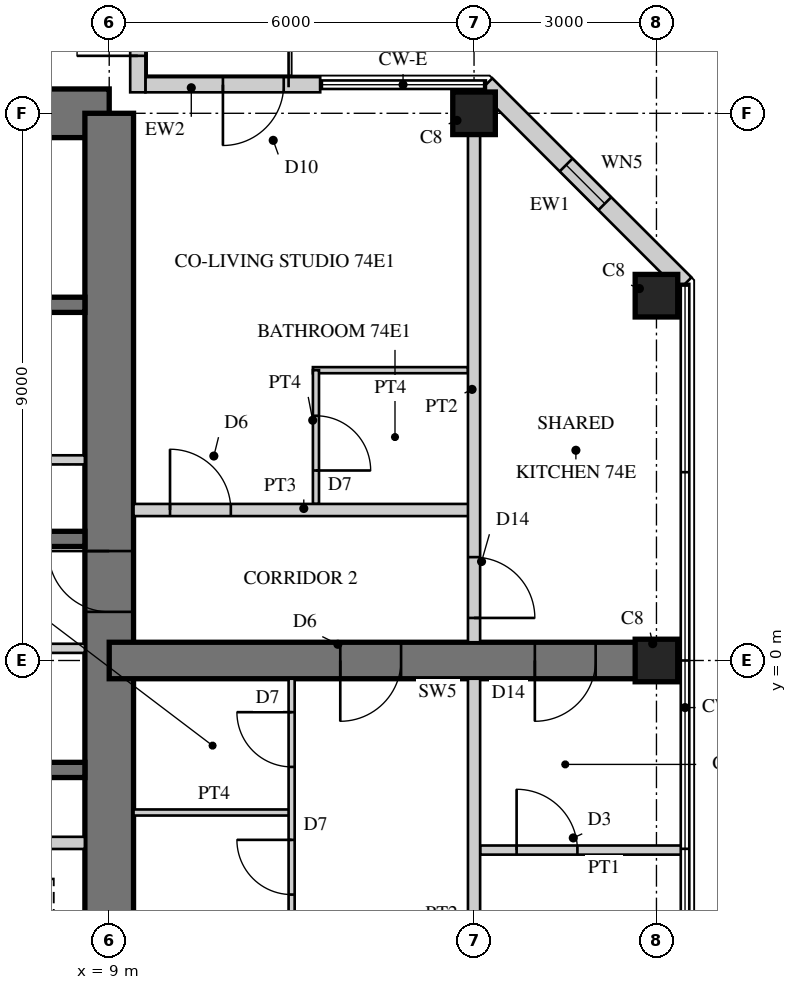
"""IFC4 building model, lengths in metres.
Left out: names, types, materials, properties, quantities, classifications, styles, units other than length and angle.
Written with IfcOpenShell. Run it as: python <this file> out.ifc"""

import sys

from ifc_helpers import new_model, si_unit, direction, frame, frame_2d, origin, origin_2d, place, context, subcontext, project, spatial, rectangle, hollow_rectangle, extrude, element, fill, save


model = new_model("IFC4")
c1 = context("Model", 3, precision=1e-05, world=origin(), true_north=direction((0.0, 1.0)))
c2 = subcontext(c1, "Body", "Model", "MODEL_VIEW")
j1 = project(units=[si_unit("LENGTHUNIT", "METRE"), si_unit("PLANEANGLEUNIT", "RADIAN")], contexts=[c1])
p1 = place(None, origin())
s1 = spatial("IfcSite", under=j1, at=p1, CompositionType="ELEMENT")
p2 = place(p1, origin())
s2 = spatial("IfcBuilding", under=s1, at=p2, CompositionType="ELEMENT")
p3 = place(p2, frame((0.0, 0.0, 284.9)))
s3 = spatial("IfcBuildingStorey", under=s2, at=p3, CompositionType="ELEMENT", Elevation=284.9)
p4 = place(p3, frame((9.0, 9.0, 0.0), z_axis=(0.0, 0.0, 1.0), x_axis=(-1.0, 0.0, 0.0)))
e1 = element("IfcWall", 1, at=p4, inside=s3, PredefinedType="SHEAR", context=c2, shape_type="SweptSolid", body=[
    extrude(rectangle(XDim=18.0, YDim=0.8, at=frame_2d((9.0, 0.0))), origin(), (0.0, 0.0, 1.0), 3.4),
])
p5 = place(p4, frame((9.8, 0.0, 0.0)))
e2 = element("IfcOpeningElement", 2, at=p5, cuts=e1, PredefinedType="OPENING", context=c2, shape_type="SweptSolid", body=[
    extrude(rectangle(XDim=1.0, YDim=2.4, at=frame_2d((0.5, 1.2))), frame((0.0, 0.41, 0.0), z_axis=(0.0, -1.0, 0.0), x_axis=(1.0, 0.0, 0.0)), (0.0, 0.0, 1.0), 0.82),
])
p6 = place(p3, frame((9.0, -9.0, 0.0), z_axis=(0.0, 0.0, 1.0), x_axis=(0.0, 1.0, 0.0)))
e3 = element("IfcWall", 3, at=p6, inside=s3, PredefinedType="SHEAR", context=c2, shape_type="SweptSolid", body=[
    extrude(rectangle(XDim=18.0, YDim=0.8, at=frame_2d((9.0, 0.0))), origin(), (0.0, 0.0, 1.0), 3.4),
])
p7 = place(p6, frame((9.8, 0.0, 0.0)))
e4 = element("IfcOpeningElement", 4, at=p7, cuts=e3, PredefinedType="OPENING", context=c2, shape_type="SweptSolid", body=[
    extrude(rectangle(XDim=1.0, YDim=2.4, at=frame_2d((0.5, 1.2))), frame((0.0, 0.41, 0.0), z_axis=(0.0, -1.0, 0.0), x_axis=(1.0, 0.0, 0.0)), (0.0, 0.0, 1.0), 0.82),
])
p8 = place(p3, frame((1.925, 2.0, 0.0), z_axis=(0.0, 0.0, 1.0), x_axis=(1.0, 0.0, 0.0)))
e5 = element("IfcWall", 5, at=p8, inside=s3, PredefinedType="SHEAR", context=c2, shape_type="SweptSolid", body=[
    extrude(rectangle(XDim=6.675, YDim=0.25, at=frame_2d((3.337, 0.0))), origin(), (0.0, 0.0, 1.0), 3.4),
])
p9 = place(p3, frame((1.925, 5.85, 0.0), z_axis=(0.0, 0.0, 1.0), x_axis=(1.0, 0.0, 0.0)))
e6 = element("IfcWall", 6, at=p9, inside=s3, PredefinedType="SHEAR", context=c2, shape_type="SweptSolid", body=[
    extrude(rectangle(XDim=6.675, YDim=0.25, at=frame_2d((3.337, 0.0))), origin(), (0.0, 0.0, 1.0), 3.4),
])
p10 = place(p9, frame((0.546, 0.0, 0.0)))
e7 = element("IfcOpeningElement", 7, at=p10, cuts=e6, PredefinedType="OPENING", context=c2, shape_type="SweptSolid", body=[
    extrude(rectangle(XDim=1.0, YDim=2.1, at=frame_2d((0.5, 1.05))), frame((0.0, 0.135, 0.0), z_axis=(0.0, -1.0, 0.0), x_axis=(1.0, 0.0, 0.0)), (0.0, 0.0, 1.0), 0.27),
])
p11 = place(p9, frame((2.837, 0.0, 0.0)))
e8 = element("IfcOpeningElement", 8, at=p11, cuts=e6, PredefinedType="OPENING", context=c2, shape_type="SweptSolid", body=[
    extrude(rectangle(XDim=1.0, YDim=2.1, at=frame_2d((0.5, 1.05))), frame((0.0, 0.135, 0.0), z_axis=(0.0, -1.0, 0.0), x_axis=(1.0, 0.0, 0.0)), (0.0, 0.0, 1.0), 0.27),
])
p12 = place(p3, frame((1.925, 3.3, 0.0), z_axis=(0.0, 0.0, 1.0), x_axis=(1.0, 0.0, 0.0)))
e9 = element("IfcWall", 9, at=p12, inside=s3, PredefinedType="PARTITIONING", context=c2, shape_type="SweptSolid", body=[
    extrude(rectangle(XDim=6.675, YDim=0.15, at=frame_2d((3.337, 0.0))), origin(), (0.0, 0.0, 1.0), 3.4),
])
p13 = place(p12, frame((0.075, 0.0, 0.0)))
e10 = element("IfcOpeningElement", 10, at=p13, cuts=e9, PredefinedType="OPENING", context=c2, shape_type="SweptSolid", body=[
    extrude(rectangle(XDim=0.8, YDim=2.1, at=frame_2d((0.4, 1.05))), frame((0.0, 0.085, 0.0), z_axis=(0.0, -1.0, 0.0), x_axis=(1.0, 0.0, 0.0)), (0.0, 0.0, 1.0), 0.17),
])
p14 = place(p12, frame((3.675, 0.0, 0.0)))
e11 = element("IfcOpeningElement", 11, at=p14, cuts=e9, PredefinedType="OPENING", context=c2, shape_type="SweptSolid", body=[
    extrude(rectangle(XDim=0.8, YDim=2.1, at=frame_2d((0.4, 1.05))), frame((0.0, 0.085, 0.0), z_axis=(0.0, -1.0, 0.0), x_axis=(1.0, 0.0, 0.0)), (0.0, 0.0, 1.0), 0.17),
])
p15 = place(p3, frame((2.125, -1.8, 0.0), z_axis=(0.0, 0.0, 1.0), x_axis=(1.0, 0.0, 0.0)))
e12 = element("IfcWall", 12, at=p15, inside=s3, PredefinedType="SHEAR", context=c2, shape_type="SweptSolid", body=[
    extrude(rectangle(XDim=6.475, YDim=0.25, at=frame_2d((3.238, 0.0))), origin(), (0.0, 0.0, 1.0), 3.4),
])
p16 = place(p3, frame((5.725, -3.0, 0.0), z_axis=(0.0, 0.0, 1.0), x_axis=(1.0, 0.0, 0.0)))
e13 = element("IfcWall", 13, at=p16, inside=s3, PredefinedType="PARTITIONING", context=c2, shape_type="SweptSolid", body=[
    extrude(rectangle(XDim=2.875, YDim=0.2, at=frame_2d((1.438, 0.0))), origin(), (0.0, 0.0, 1.0), 3.4),
])
p17 = place(p3, frame((9.0, 0.0, 0.0), z_axis=(0.0, 0.0, 1.0), x_axis=(1.0, 0.0, 0.0)))
e14 = element("IfcWall", 14, at=p17, inside=s3, PredefinedType="SHEAR", context=c2, shape_type="SweptSolid", body=[
    extrude(rectangle(XDim=9.0, YDim=0.6, at=frame_2d((4.5, 0.0))), origin(), (0.0, 0.0, 1.0), 3.4),
])
p18 = place(p17, frame((3.8, 0.0, 0.0)))
e15 = element("IfcOpeningElement", 15, at=p18, cuts=e14, PredefinedType="OPENING", context=c2, shape_type="SweptSolid", body=[
    extrude(rectangle(XDim=1.0, YDim=2.15, at=frame_2d((0.5, 1.075))), frame((0.0, 0.31, 0.0), z_axis=(0.0, -1.0, 0.0), x_axis=(1.0, 0.0, 0.0)), (0.0, 0.0, 1.0), 0.62),
])
p19 = place(p17, frame((7.0, 0.0, 0.0)))
e16 = element("IfcOpeningElement", 16, at=p19, cuts=e14, PredefinedType="OPENING", context=c2, shape_type="SweptSolid", body=[
    extrude(rectangle(XDim=1.0, YDim=2.2, at=frame_2d((0.5, 1.1))), frame((0.0, 0.31, 0.0), z_axis=(0.0, -1.0, 0.0), x_axis=(1.0, 0.0, 0.0)), (0.0, 0.0, 1.0), 0.62),
])
for number, where, z_axis, x_axis in (
    (17, (15.0, 9.0, 0.0), (0.0, 0.0, 1.0), (1.0, 0.0, 0.0)),
    (18, (18.0, 0.0, 0.0), (0.0, 0.0, 1.0), (1.0, 0.0, 0.0)),
    (19, (18.0, 6.0, 0.0), (0.0, 0.0, 1.0), (1.0, 0.0, 0.0)),
):
    element("IfcColumn", number, at=place(p3, frame(where, z_axis=z_axis, x_axis=x_axis)), inside=s3, PredefinedType="COLUMN", context=c2, shape_type="SweptSolid", body=[
        extrude(rectangle(XDim=0.7, YDim=0.7, at=origin_2d()), origin(), (0.0, 0.0, 1.0), 3.4),
    ])
p20 = place(p3, frame((18.47, 6.195, 0.0), z_axis=(0.0, 0.0, 1.0), x_axis=(-0.707106781187, 0.707106781187, 0.0)))
e20 = element("IfcWall", 20, at=p20, inside=s3, PredefinedType="SOLIDWALL", context=c2, shape_type="SweptSolid", body=[
    extrude(rectangle(XDim=4.632, YDim=0.3, at=frame_2d((2.316, 0.0))), origin(), (0.0, 0.0, 1.0), 3.2),
])
p21 = place(p20, frame((1.866, 0.0, 0.3)))
e21 = element("IfcOpeningElement", 21, at=p21, cuts=e20, PredefinedType="OPENING", context=c2, shape_type="SweptSolid", body=[
    extrude(rectangle(XDim=0.9, YDim=2.4, at=frame_2d((0.45, 1.2))), frame((0.0, 0.16, 0.0), z_axis=(0.0, -1.0, 0.0), x_axis=(1.0, 0.0, 0.0)), (0.0, 0.0, 1.0), 0.32),
])
p22 = place(p3, frame((12.47, 9.47, 0.0), z_axis=(0.0, 0.0, 1.0), x_axis=(-1.0, 0.0, 0.0)))
e22 = element("IfcWall", 22, at=p22, inside=s3, PredefinedType="SOLIDWALL", context=c2, shape_type="SweptSolid", body=[
    extrude(rectangle(XDim=2.875, YDim=0.25, at=frame_2d((1.438, 0.0))), origin(), (0.0, 0.0, 1.0), 3.2),
])
p23 = place(p22, frame((0.6, 0.0, 0.0)))
e23 = element("IfcOpeningElement", 23, at=p23, cuts=e22, PredefinedType="OPENING", context=c2, shape_type="SweptSolid", body=[
    extrude(rectangle(XDim=1.0, YDim=2.2, at=frame_2d((0.5, 1.1))), frame((0.0, 0.135, 0.0), z_axis=(0.0, -1.0, 0.0), x_axis=(1.0, 0.0, 0.0)), (0.0, 0.0, 1.0), 0.27),
])
p24 = place(p3, frame((9.47, 9.345, 0.0), z_axis=(0.0, 0.0, 1.0), x_axis=(0.0, 1.0, 0.0)))
e24 = element("IfcWall", 24, at=p24, inside=s3, PredefinedType="SOLIDWALL", context=c2, shape_type="SweptSolid", body=[
    extrude(rectangle(XDim=3.125, YDim=0.25, at=frame_2d((1.562, 0.0))), origin(), (0.0, 0.0, 1.0), 3.2),
])
p25 = place(p24, frame((0.6, 0.0, 0.0)))
e25 = element("IfcOpeningElement", 25, at=p25, cuts=e24, PredefinedType="OPENING", context=c2, shape_type="SweptSolid", body=[
    extrude(rectangle(XDim=1.0, YDim=2.2, at=frame_2d((0.5, 1.1))), frame((0.0, 0.135, 0.0), z_axis=(0.0, -1.0, 0.0), x_axis=(1.0, 0.0, 0.0)), (0.0, 0.0, 1.0), 0.27),
])
p26 = place(p3, frame((2.325, 0.2, 0.0), z_axis=(0.0, 0.0, 1.0), x_axis=(1.0, 0.0, 0.0)))
e26 = element("IfcWall", 26, at=p26, inside=s3, PredefinedType="PARTITIONING", context=c2, shape_type="SweptSolid", body=[
    extrude(rectangle(XDim=6.275, YDim=0.15, at=frame_2d((3.138, 0.0))), origin(), (0.0, 0.0, 1.0), 3.2),
])
p27 = place(p26, frame((0.4, 0.0, 0.0)))
e27 = element("IfcOpeningElement", 27, at=p27, cuts=e26, PredefinedType="OPENING", context=c2, shape_type="SweptSolid", body=[
    extrude(rectangle(XDim=1.0, YDim=2.1, at=frame_2d((0.5, 1.05))), frame((0.0, 0.085, 0.0), z_axis=(0.0, -1.0, 0.0), x_axis=(1.0, 0.0, 0.0)), (0.0, 0.0, 1.0), 0.17),
])
p28 = place(p3, frame((12.35, 4.775, 0.0), z_axis=(0.0, 0.0, 1.0), x_axis=(1.0, 0.0, 0.0)))
e28 = element("IfcWall", 28, at=p28, inside=s3, PredefinedType="PARTITIONING", context=c2, shape_type="SweptSolid", body=[
    extrude(rectangle(XDim=2.55, YDim=0.1, at=frame_2d((1.275, 0.0))), origin(), (0.0, 0.0, 1.0), 3.2),
])
p29 = place(p3, frame((12.4, 2.575, 0.0), z_axis=(0.0, 0.0, 1.0), x_axis=(0.0, 1.0, 0.0)))
e29 = element("IfcWall", 29, at=p29, inside=s3, PredefinedType="PARTITIONING", context=c2, shape_type="SweptSolid", body=[
    extrude(rectangle(XDim=2.2, YDim=0.1, at=frame_2d((1.1, 0.0))), origin(), (0.0, 0.0, 1.0), 3.2),
])
p30 = place(p29, frame((0.55, 0.0, 0.0)))
e30 = element("IfcOpeningElement", 30, at=p30, cuts=e29, PredefinedType="OPENING", context=c2, shape_type="SweptSolid", body=[
    extrude(rectangle(XDim=0.9, YDim=2.1, at=frame_2d((0.45, 1.05))), frame((0.0, 0.06, 0.0), z_axis=(0.0, -1.0, 0.0), x_axis=(1.0, 0.0, 0.0)), (0.0, 0.0, 1.0), 0.12),
])
p31 = place(p3, frame((9.4, -2.5, 0.0), z_axis=(0.0, 0.0, 1.0), x_axis=(1.0, 0.0, 0.0)))
e31 = element("IfcWall", 31, at=p31, inside=s3, PredefinedType="PARTITIONING", context=c2, shape_type="SweptSolid", body=[
    extrude(rectangle(XDim=2.65, YDim=0.1, at=frame_2d((1.325, 0.0))), origin(), (0.0, 0.0, 1.0), 3.2),
])
p32 = place(p3, frame((12.0, -9.345, 0.0), z_axis=(0.0, 0.0, 1.0), x_axis=(0.0, 1.0, 0.0)))
e32 = element("IfcWall", 32, at=p32, inside=s3, PredefinedType="PARTITIONING", context=c2, shape_type="SweptSolid", body=[
    extrude(rectangle(XDim=9.045, YDim=0.1, at=frame_2d((4.522, 0.0))), origin(), (0.0, 0.0, 1.0), 3.2),
])
p33 = place(p32, frame((5.495, 0.0, 0.0)))
e33 = element("IfcOpeningElement", 33, at=p33, cuts=e32, PredefinedType="OPENING", context=c2, shape_type="SweptSolid", body=[
    extrude(rectangle(XDim=0.9, YDim=2.1, at=frame_2d((0.45, 1.05))), frame((0.0, 0.06, 0.0), z_axis=(0.0, -1.0, 0.0), x_axis=(1.0, 0.0, 0.0)), (0.0, 0.0, 1.0), 0.12),
])
p34 = place(p32, frame((7.595, 0.0, 0.0)))
e34 = element("IfcOpeningElement", 34, at=p34, cuts=e32, PredefinedType="OPENING", context=c2, shape_type="SweptSolid", body=[
    extrude(rectangle(XDim=0.9, YDim=2.1, at=frame_2d((0.45, 1.05))), frame((0.0, 0.06, 0.0), z_axis=(0.0, -1.0, 0.0), x_axis=(1.0, 0.0, 0.0)), (0.0, 0.0, 1.0), 0.12),
])
p35 = place(p3, frame((9.4, 2.475, 0.0), z_axis=(0.0, 0.0, 1.0), x_axis=(1.0, 0.0, 0.0)))
e35 = element("IfcWall", 35, at=p35, inside=s3, PredefinedType="SOLIDWALL", context=c2, shape_type="SweptSolid", body=[
    extrude(rectangle(XDim=5.6, YDim=0.2, at=frame_2d((2.8, 0.0))), origin(), (0.0, 0.0, 1.0), 3.2),
])
p36 = place(p35, frame((0.6, 0.0, 0.0)))
e36 = element("IfcOpeningElement", 36, at=p36, cuts=e35, PredefinedType="OPENING", context=c2, shape_type="SweptSolid", body=[
    extrude(rectangle(XDim=1.0, YDim=2.15, at=frame_2d((0.5, 1.075))), frame((0.0, 0.11, 0.0), z_axis=(0.0, -1.0, 0.0), x_axis=(1.0, 0.0, 0.0)), (0.0, 0.0, 1.0), 0.22),
])
p37 = place(p3, frame((15.1, -3.118, 0.0), z_axis=(0.0, 0.0, 1.0), x_axis=(1.0, 0.0, 0.0)))
e37 = element("IfcWall", 37, at=p37, inside=s3, PredefinedType="PARTITIONING", context=c2, shape_type="SweptSolid", body=[
    extrude(rectangle(XDim=3.33, YDim=0.15, at=frame_2d((1.665, 0.0))), origin(), (0.0, 0.0, 1.0), 3.2),
])
p38 = place(p37, frame((0.6, 0.0, 0.0)))
e38 = element("IfcOpeningElement", 38, at=p38, cuts=e37, PredefinedType="OPENING", context=c2, shape_type="SweptSolid", body=[
    extrude(rectangle(XDim=1.0, YDim=2.1, at=frame_2d((0.5, 1.05))), frame((0.0, 0.085, 0.0), z_axis=(0.0, -1.0, 0.0), x_axis=(1.0, 0.0, 0.0)), (0.0, 0.0, 1.0), 0.17),
])
p39 = place(p3, frame((15.0, -8.65, 0.0), z_axis=(0.0, 0.0, 1.0), x_axis=(0.0, 1.0, 0.0)))
e39 = element("IfcWall", 39, at=p39, inside=s3, PredefinedType="SOLIDWALL", context=c2, shape_type="SweptSolid", body=[
    extrude(rectangle(XDim=8.35, YDim=0.2, at=frame_2d((4.175, 0.0))), origin(), (0.0, 0.0, 1.0), 2.5),
])
p40 = place(p3, frame((15.0, 0.3, 0.0), z_axis=(0.0, 0.0, 1.0), x_axis=(0.0, 1.0, 0.0)))
e40 = element("IfcWall", 40, at=p40, inside=s3, PredefinedType="SOLIDWALL", context=c2, shape_type="SweptSolid", body=[
    extrude(rectangle(XDim=8.35, YDim=0.2, at=frame_2d((4.175, 0.0))), origin(), (0.0, 0.0, 1.0), 2.5),
])
p41 = place(p40, frame((0.4, 0.0, 0.0)))
e41 = element("IfcOpeningElement", 41, at=p41, cuts=e40, PredefinedType="OPENING", context=c2, shape_type="SweptSolid", body=[
    extrude(rectangle(XDim=1.0, YDim=2.2, at=frame_2d((0.5, 1.1))), frame((0.0, 0.11, 0.0), z_axis=(0.0, -1.0, 0.0), x_axis=(1.0, 0.0, 0.0)), (0.0, 0.0, 1.0), 0.22),
])
p42 = place(p21, origin())
e42 = element("IfcWindow", 42, at=p42, inside=s3, PartitioningType="SINGLE_PANEL", PredefinedType="WINDOW", context=c2, shape_type="SweptSolid", body=[
    extrude(hollow_rectangle(XDim=0.9, YDim=2.4, WallThickness=0.06, at=frame_2d((0.45, 1.2))), frame((0.0, 0.03, 0.0), z_axis=(0.0, -1.0, 0.0), x_axis=(1.0, 0.0, 0.0)), (0.0, 0.0, 1.0), 0.06),
    extrude(rectangle(XDim=0.779, YDim=2.279, at=frame_2d((0.45, 1.2))), frame((0.0, 0.03, 0.0), z_axis=(0.0, -1.0, 0.0), x_axis=(1.0, 0.0, 0.0)), (0.0, 0.0, 1.0), 0.06),
])
fill(e21, e42)
p43 = place(p23, origin())
e43 = element("IfcDoor", 43, at=p43, inside=s3, OperationType="SINGLE_SWING_RIGHT", PredefinedType="DOOR", context=c2, shape_type="SweptSolid", body=[
    extrude(hollow_rectangle(XDim=1.0, YDim=2.2, WallThickness=0.06, at=frame_2d((0.5, 1.1))), frame((0.0, 0.025, 0.0), z_axis=(0.0, -1.0, 0.0), x_axis=(1.0, 0.0, 0.0)), (0.0, 0.0, 1.0), 0.05),
    extrude(rectangle(XDim=0.879, YDim=2.079, at=frame_2d((0.5, 1.1))), frame((0.0, 0.025, 0.0), z_axis=(0.0, -1.0, 0.0), x_axis=(1.0, 0.0, 0.0)), (0.0, 0.0, 1.0), 0.05),
])
fill(e23, e43)
p44 = place(p25, origin())
e44 = element("IfcDoor", 44, at=p44, inside=s3, OperationType="SINGLE_SWING_LEFT", PredefinedType="DOOR", context=c2, shape_type="SweptSolid", body=[
    extrude(hollow_rectangle(XDim=1.0, YDim=2.2, WallThickness=0.06, at=frame_2d((0.5, 1.1))), frame((0.0, 0.025, 0.0), z_axis=(0.0, -1.0, 0.0), x_axis=(1.0, 0.0, 0.0)), (0.0, 0.0, 1.0), 0.05),
    extrude(rectangle(XDim=0.879, YDim=2.079, at=frame_2d((0.5, 1.1))), frame((0.0, 0.025, 0.0), z_axis=(0.0, -1.0, 0.0), x_axis=(1.0, 0.0, 0.0)), (0.0, 0.0, 1.0), 0.05),
])
fill(e25, e44)
p45 = place(p30, frame((0.9, 0.0, 0.0), z_axis=(0.0, 0.0, 1.0), x_axis=(-1.0, 0.0, 0.0)))
e45 = element("IfcDoor", 45, at=p45, inside=s3, OperationType="SINGLE_SWING_RIGHT", PredefinedType="DOOR", context=c2, shape_type="SweptSolid", body=[
    extrude(rectangle(XDim=0.9, YDim=2.1, at=frame_2d((0.45, 1.05))), frame((0.0, 0.025, 0.0), z_axis=(0.0, -1.0, 0.0), x_axis=(1.0, 0.0, 0.0)), (0.0, 0.0, 1.0), 0.05),
])
fill(e30, e45)
p46 = place(p33, origin())
e46 = element("IfcDoor", 46, at=p46, inside=s3, OperationType="SINGLE_SWING_RIGHT", PredefinedType="DOOR", context=c2, shape_type="SweptSolid", body=[
    extrude(rectangle(XDim=0.9, YDim=2.1, at=frame_2d((0.45, 1.05))), frame((0.0, 0.025, 0.0), z_axis=(0.0, -1.0, 0.0), x_axis=(1.0, 0.0, 0.0)), (0.0, 0.0, 1.0), 0.05),
])
fill(e33, e46)
p47 = place(p34, origin())
e47 = element("IfcDoor", 47, at=p47, inside=s3, OperationType="SINGLE_SWING_RIGHT", PredefinedType="DOOR", context=c2, shape_type="SweptSolid", body=[
    extrude(rectangle(XDim=0.9, YDim=2.1, at=frame_2d((0.45, 1.05))), frame((0.0, 0.025, 0.0), z_axis=(0.0, -1.0, 0.0), x_axis=(1.0, 0.0, 0.0)), (0.0, 0.0, 1.0), 0.05),
])
fill(e34, e47)
p48 = place(p36, origin())
e48 = element("IfcDoor", 48, at=p48, inside=s3, OperationType="SINGLE_SWING_LEFT", PredefinedType="DOOR", context=c2, shape_type="SweptSolid", body=[
    extrude(rectangle(XDim=1.0, YDim=2.15, at=frame_2d((0.5, 1.075))), frame((0.0, 0.025, 0.0), z_axis=(0.0, -1.0, 0.0), x_axis=(1.0, 0.0, 0.0)), (0.0, 0.0, 1.0), 0.05),
])
fill(e36, e48)
p49 = place(p38, origin())
e49 = element("IfcDoor", 49, at=p49, inside=s3, OperationType="SINGLE_SWING_LEFT", PredefinedType="DOOR", context=c2, shape_type="SweptSolid", body=[
    extrude(rectangle(XDim=1.0, YDim=2.1, at=frame_2d((0.5, 1.05))), frame((0.0, 0.025, 0.0), z_axis=(0.0, -1.0, 0.0), x_axis=(1.0, 0.0, 0.0)), (0.0, 0.0, 1.0), 0.05),
])
fill(e38, e49)
p50 = place(p41, frame((1.0, 0.0, 0.0), z_axis=(0.0, 0.0, 1.0), x_axis=(-1.0, 0.0, 0.0)))
e50 = element("IfcDoor", 50, at=p50, inside=s3, OperationType="SINGLE_SWING_RIGHT", PredefinedType="DOOR", context=c2, shape_type="SweptSolid", body=[
    extrude(rectangle(XDim=1.0, YDim=2.2, at=frame_2d((0.5, 1.1))), frame((0.0, 0.025, 0.0), z_axis=(0.0, -1.0, 0.0), x_axis=(1.0, 0.0, 0.0)), (0.0, 0.0, 1.0), 0.05),
])
fill(e41, e50)
p51 = place(p18, frame((1.0, 0.0, 0.0), z_axis=(0.0, 0.0, 1.0), x_axis=(-1.0, 0.0, 0.0)))
e51 = element("IfcDoor", 51, at=p51, inside=s3, OperationType="SINGLE_SWING_RIGHT", PredefinedType="DOOR", context=c2, shape_type="SweptSolid", body=[
    extrude(rectangle(XDim=1.0, YDim=2.15, at=frame_2d((0.5, 1.075))), frame((0.0, 0.025, 0.0), z_axis=(0.0, -1.0, 0.0), x_axis=(1.0, 0.0, 0.0)), (0.0, 0.0, 1.0), 0.05),
])
fill(e15, e51)
p52 = place(p19, frame((1.0, 0.0, 0.0), z_axis=(0.0, 0.0, 1.0), x_axis=(-1.0, 0.0, 0.0)))
e52 = element("IfcDoor", 52, at=p52, inside=s3, OperationType="SINGLE_SWING_RIGHT", PredefinedType="DOOR", context=c2, shape_type="SweptSolid", body=[
    extrude(rectangle(XDim=1.0, YDim=2.2, at=frame_2d((0.5, 1.1))), frame((0.0, 0.025, 0.0), z_axis=(0.0, -1.0, 0.0), x_axis=(1.0, 0.0, 0.0)), (0.0, 0.0, 1.0), 0.05),
])
fill(e16, e52)
p53 = place(p7, origin())
e53 = element("IfcDoor", 53, at=p53, inside=s3, OperationType="SINGLE_SWING_RIGHT", PredefinedType="DOOR", context=c2, shape_type="SweptSolid", body=[
    extrude(rectangle(XDim=1.0, YDim=2.4, at=frame_2d((0.5, 1.2))), frame((0.0, 0.055, 0.0), z_axis=(0.0, -1.0, 0.0), x_axis=(1.0, 0.0, 0.0)), (0.0, 0.0, 1.0), 0.05),
])
fill(e4, e53)
save(model, sys.argv[1])
